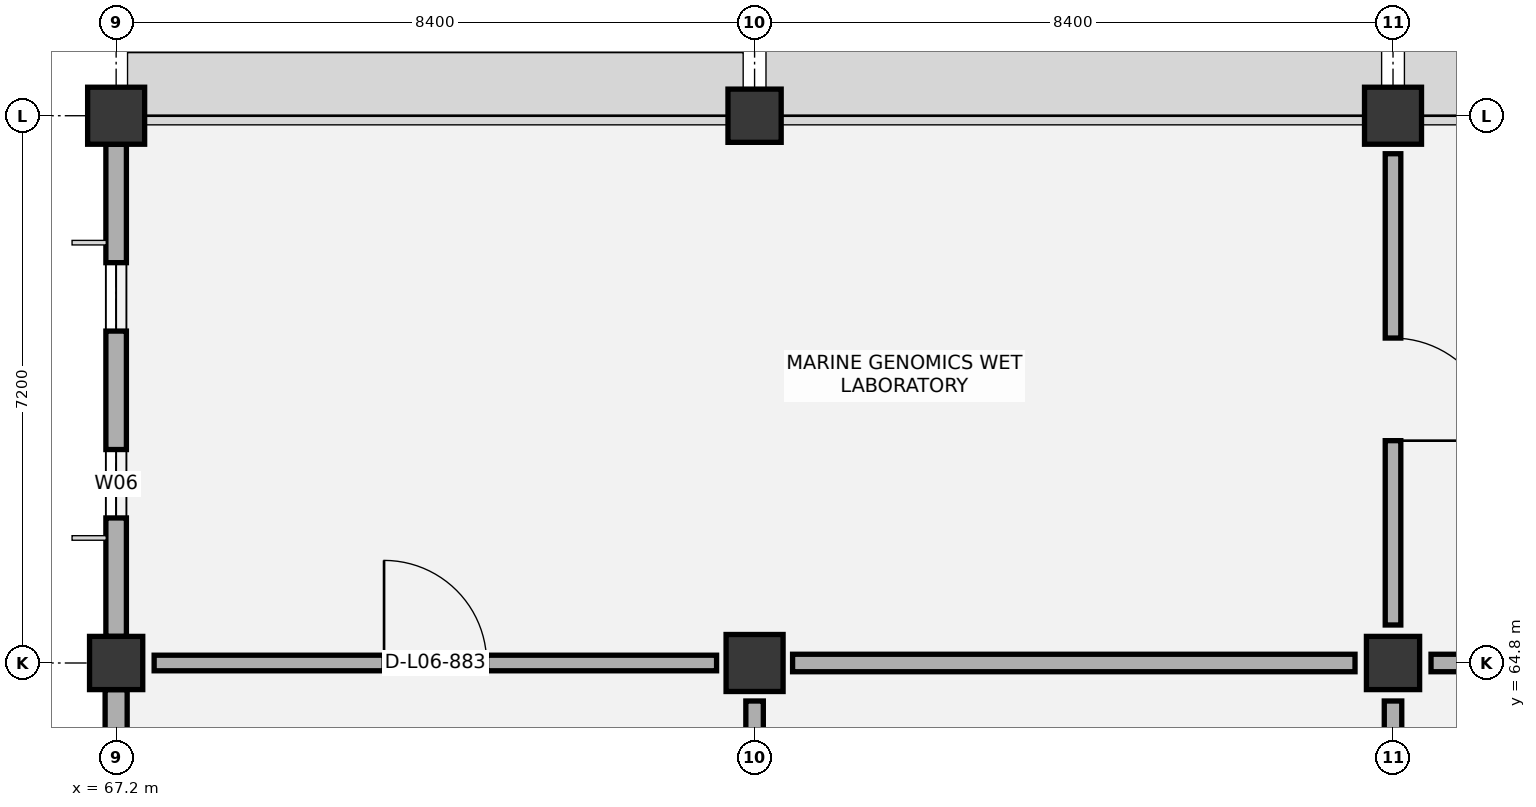
"""IFC4 building model, lengths in metres.
Left out: names, types, materials, properties, quantities, classifications, styles, units other than length and angle.
Written with IfcOpenShell. Run it as: python <this file> out.ifc"""

import sys

from ifc_helpers import new_model, si_unit, direction, frame, frame_2d, origin, origin_2d, place, context, subcontext, project, spatial, rectangle, extrude, element, fill, save


model = new_model("IFC4")
c1 = context("Model", 3, precision=1e-05, world=origin(), true_north=direction((0.0, 1.0)))
c2 = subcontext(c1, "Body", "Model", "MODEL_VIEW")
j1 = project(units=[si_unit("LENGTHUNIT", "METRE"), si_unit("PLANEANGLEUNIT", "RADIAN")], contexts=[c1])
p1 = place(None, origin())
s1 = spatial("IfcSite", under=j1, at=p1, CompositionType="ELEMENT")
p2 = place(p1, origin())
s2 = spatial("IfcBuilding", under=s1, at=p2, CompositionType="ELEMENT")
p3 = place(p2, frame((0.0, 0.0, 31.2)))
s3 = spatial("IfcBuildingStorey", under=s2, at=p3, CompositionType="ELEMENT", Elevation=31.2)
p4 = place(p3, frame((67.2, 64.8, 0.0), z_axis=(0.0, 0.0, 1.0), x_axis=(1.0, 0.0, 0.0)))
e1 = element("IfcColumn", 1, at=p4, inside=s3, PredefinedType="COLUMN", context=c2, shape_type="SweptSolid", body=[
    extrude(rectangle(XDim=0.7, YDim=0.7, at=origin_2d()), origin(), (0.0, 0.0, 1.0), 4.2),
])
for number, where, z_axis, x_axis in (
    (2, (67.2, 72.0, 0.0), (0.0, 0.0, 1.0), (1.0, 0.0, 0.0)),
    (3, (75.6, 64.8, 0.0), (0.0, 0.0, 1.0), (1.0, 0.0, 0.0)),
):
    element("IfcColumn", number, at=place(p3, frame(where, z_axis=z_axis, x_axis=x_axis)), inside=s3, PredefinedType="COLUMN", context=c2, shape_type="SweptSolid", body=[
        extrude(rectangle(XDim=0.75, YDim=0.75, at=origin_2d()), origin(), (0.0, 0.0, 1.0), 4.2),
    ])
for number, where, z_axis, x_axis in (
    (4, (75.6, 72.0, 0.0), (0.0, 0.0, 1.0), (1.0, 0.0, 0.0)),
    (5, (84.0, 64.8, 0.0), (0.0, 0.0, 1.0), (1.0, 0.0, 0.0)),
):
    element("IfcColumn", number, at=place(p3, frame(where, z_axis=z_axis, x_axis=x_axis)), inside=s3, PredefinedType="COLUMN", context=c2, shape_type="SweptSolid", body=[
        extrude(rectangle(XDim=0.7, YDim=0.7, at=origin_2d()), origin(), (0.0, 0.0, 1.0), 4.2),
    ])
p5 = place(p3, frame((84.0, 72.0, 0.0), z_axis=(0.0, 0.0, 1.0), x_axis=(1.0, 0.0, 0.0)))
e6 = element("IfcColumn", 6, at=p5, inside=s3, PredefinedType="COLUMN", context=c2, shape_type="SweptSolid", body=[
    extrude(rectangle(XDim=0.75, YDim=0.75, at=origin_2d()), origin(), (0.0, 0.0, 1.0), 4.2),
])
p6 = place(p3, frame((67.2, 57.975, 0.0), z_axis=(0.0, 0.0, 1.0), x_axis=(0.0, 1.0, 0.0)))
e7 = element("IfcWall", 7, at=p6, inside=s3, PredefinedType="SOLIDWALL", context=c2, shape_type="SweptSolid", body=[
    extrude(rectangle(XDim=6.475, YDim=0.29, at=frame_2d((3.237, 0.0))), origin(), (0.0, 0.0, 1.0), 3.365),
])
p7 = place(p6, frame((2.038, 0.0, 0.9)))
e8 = element("IfcOpeningElement", 8, at=p7, cuts=e7, PredefinedType="OPENING", context=c2, shape_type="SweptSolid", body=[
    extrude(rectangle(XDim=2.4, YDim=1.8, at=frame_2d((1.2, 0.9))), frame((0.0, 0.155, 0.0), z_axis=(0.0, -1.0, 0.0), x_axis=(1.0, 0.0, 0.0)), (0.0, 0.0, 1.0), 0.31),
])
p8 = place(p3, frame((67.2, 65.15, 0.0), z_axis=(0.0, 0.0, 1.0), x_axis=(0.0, 1.0, 0.0)))
e9 = element("IfcWall", 9, at=p8, inside=s3, PredefinedType="SOLIDWALL", context=c2, shape_type="SweptSolid", body=[
    extrude(rectangle(XDim=6.475, YDim=0.27, at=frame_2d((3.238, 0.0))), origin(), (0.0, 0.0, 1.0), 3.365),
])
p9 = place(p8, frame((1.558, 0.0, 0.9)))
e10 = element("IfcOpeningElement", 10, at=p9, cuts=e9, PredefinedType="OPENING", context=c2, shape_type="SweptSolid", body=[
    extrude(rectangle(XDim=0.9, YDim=1.8, at=frame_2d((0.45, 0.9))), frame((0.0, 0.145, 0.0), z_axis=(0.0, -1.0, 0.0), x_axis=(1.0, 0.0, 0.0)), (0.0, 0.0, 1.0), 0.29),
])
p10 = place(p8, frame((4.017, 0.0, 0.9)))
e11 = element("IfcOpeningElement", 11, at=p10, cuts=e9, PredefinedType="OPENING", context=c2, shape_type="SweptSolid", body=[
    extrude(rectangle(XDim=0.9, YDim=1.8, at=frame_2d((0.45, 0.9))), frame((0.0, 0.145, 0.0), z_axis=(0.0, -1.0, 0.0), x_axis=(1.0, 0.0, 0.0)), (0.0, 0.0, 1.0), 0.29),
])
p11 = place(p3, frame((75.6, 58.1, 0.0), z_axis=(0.0, 0.0, 1.0), x_axis=(0.0, 1.0, 0.0)))
e12 = element("IfcWall", 12, at=p11, inside=s3, PredefinedType="PARTITIONING", context=c2, shape_type="SweptSolid", body=[
    extrude(rectangle(XDim=6.2, YDim=0.23, at=frame_2d((3.1, 0.0))), origin(), (0.0, 0.0, 1.0), 3.315),
])
p12 = place(p3, frame((67.7, 64.8, 0.0), z_axis=(0.0, 0.0, 1.0), x_axis=(1.0, 0.0, 0.0)))
e13 = element("IfcWall", 13, at=p12, inside=s3, PredefinedType="PARTITIONING", context=c2, shape_type="SweptSolid", body=[
    extrude(rectangle(XDim=7.4, YDim=0.205, at=frame_2d((3.7, 0.0))), origin(), (0.0, 0.0, 1.0), 3.265),
])
p13 = place(p12, frame((3.025, 0.0, 0.0)))
e14 = element("IfcOpeningElement", 14, at=p13, cuts=e13, PredefinedType="OPENING", context=c2, shape_type="SweptSolid", body=[
    extrude(rectangle(XDim=1.35, YDim=2.15, at=frame_2d((0.675, 1.075))), frame((0.0, 0.113, 0.0), z_axis=(0.0, -1.0, 0.0), x_axis=(1.0, 0.0, 0.0)), (0.0, 0.0, 1.0), 0.225),
])
p14 = place(p3, frame((84.0, 58.1, 0.0), z_axis=(0.0, 0.0, 1.0), x_axis=(0.0, 1.0, 0.0)))
e15 = element("IfcWall", 15, at=p14, inside=s3, PredefinedType="PARTITIONING", context=c2, shape_type="SweptSolid", body=[
    extrude(rectangle(XDim=6.2, YDim=0.23, at=frame_2d((3.1, 0.0))), origin(), (0.0, 0.0, 1.0), 3.515),
])
p15 = place(p14, frame((0.25, 0.0, 0.0)))
e16 = element("IfcOpeningElement", 16, at=p15, cuts=e15, PredefinedType="OPENING", context=c2, shape_type="SweptSolid", body=[
    extrude(rectangle(XDim=1.05, YDim=2.15, at=frame_2d((0.525, 1.075))), frame((0.0, 0.125, 0.0), z_axis=(0.0, -1.0, 0.0), x_axis=(1.0, 0.0, 0.0)), (0.0, 0.0, 1.0), 0.25),
])
p16 = place(p3, frame((76.1, 64.8, 0.0), z_axis=(0.0, 0.0, 1.0), x_axis=(1.0, 0.0, 0.0)))
e17 = element("IfcWall", 17, at=p16, inside=s3, PredefinedType="PARTITIONING", context=c2, shape_type="SweptSolid", body=[
    extrude(rectangle(XDim=7.4, YDim=0.23, at=frame_2d((3.7, 0.0))), origin(), (0.0, 0.0, 1.0), 3.265),
])
p17 = place(p3, frame((84.0, 65.3, 0.0), z_axis=(0.0, 0.0, 1.0), x_axis=(0.0, 1.0, 0.0)))
e18 = element("IfcWall", 18, at=p17, inside=s3, PredefinedType="PARTITIONING", context=c2, shape_type="SweptSolid", body=[
    extrude(rectangle(XDim=6.2, YDim=0.205, at=frame_2d((3.1, 0.0))), origin(), (0.0, 0.0, 1.0), 3.315),
])
p18 = place(p17, frame((2.425, 0.0, 0.0)))
e19 = element("IfcOpeningElement", 19, at=p18, cuts=e18, PredefinedType="OPENING", context=c2, shape_type="SweptSolid", body=[
    extrude(rectangle(XDim=1.35, YDim=2.15, at=frame_2d((0.675, 1.075))), frame((0.0, 0.113, 0.0), z_axis=(0.0, -1.0, 0.0), x_axis=(1.0, 0.0, 0.0)), (0.0, 0.0, 1.0), 0.225),
])
p19 = place(p3, frame((84.5, 64.8, 0.0), z_axis=(0.0, 0.0, 1.0), x_axis=(1.0, 0.0, 0.0)))
e20 = element("IfcWall", 20, at=p19, inside=s3, PredefinedType="PARTITIONING", context=c2, shape_type="SweptSolid", body=[
    extrude(rectangle(XDim=7.4, YDim=0.23, at=frame_2d((3.7, 0.0))), origin(), (0.0, 0.0, 1.0), 3.265),
])
p20 = place(p9, origin())
e21 = element("IfcWindow", 21, at=p20, inside=s3, PartitioningType="SINGLE_PANEL", PredefinedType="WINDOW", context=c2, shape_type="SweptSolid", body=[
    extrude(rectangle(XDim=0.9, YDim=1.8, at=frame_2d((0.45, 0.9))), frame((0.0, 0.03, 0.0), z_axis=(0.0, -1.0, 0.0), x_axis=(1.0, 0.0, 0.0)), (0.0, 0.0, 1.0), 0.06),
])
fill(e10, e21)
p21 = place(p10, origin())
e22 = element("IfcWindow", 22, at=p21, inside=s3, PartitioningType="SINGLE_PANEL", PredefinedType="WINDOW", context=c2, shape_type="SweptSolid", body=[
    extrude(rectangle(XDim=0.9, YDim=1.8, at=frame_2d((0.45, 0.9))), frame((0.0, 0.03, 0.0), z_axis=(0.0, -1.0, 0.0), x_axis=(1.0, 0.0, 0.0)), (0.0, 0.0, 1.0), 0.06),
])
fill(e11, e22)
p22 = place(p13, origin())
e23 = element("IfcDoor", 23, at=p22, inside=s3, OperationType="SINGLE_SWING_LEFT", PredefinedType="DOOR", context=c2, shape_type="SweptSolid", body=[
    extrude(rectangle(XDim=1.35, YDim=2.15, at=frame_2d((0.675, 1.075))), frame((0.0, 0.025, 0.0), z_axis=(0.0, -1.0, 0.0), x_axis=(1.0, 0.0, 0.0)), (0.0, 0.0, 1.0), 0.05),
])
fill(e14, e23)
p23 = place(p18, frame((1.35, 0.0, 0.0), z_axis=(0.0, 0.0, 1.0), x_axis=(-1.0, 0.0, 0.0)))
e24 = element("IfcDoor", 24, at=p23, inside=s3, OperationType="SINGLE_SWING_RIGHT", PredefinedType="DOOR", context=c2, shape_type="SweptSolid", body=[
    extrude(rectangle(XDim=1.35, YDim=2.15, at=frame_2d((0.675, 1.075))), frame((0.0, 0.025, 0.0), z_axis=(0.0, -1.0, 0.0), x_axis=(1.0, 0.0, 0.0)), (0.0, 0.0, 1.0), 0.05),
])
fill(e19, e24)
save(model, sys.argv[1])
